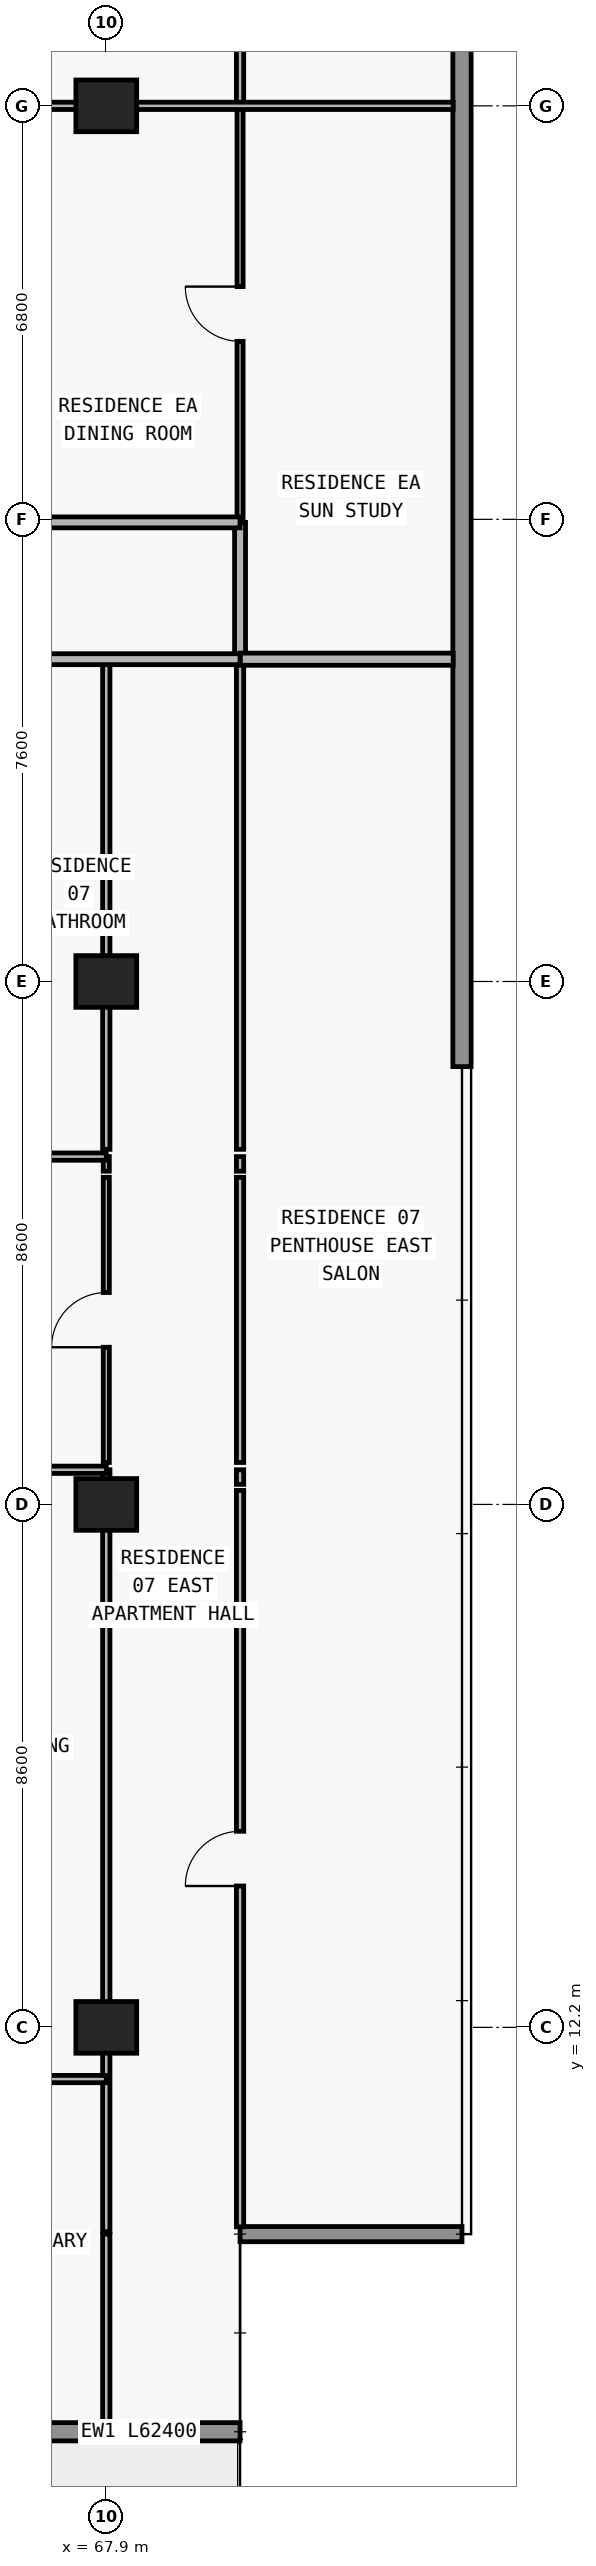
"""IFC4 building model, lengths in metres.
Left out: names, types, materials, properties, quantities, classifications, styles, units other than length and angle.
Written with IfcOpenShell. Run it as: python <this file> out.ifc"""

import sys

from ifc_helpers import new_model, si_unit, direction, frame, frame_2d, origin, origin_2d, place, context, subcontext, project, spatial, rectangle, extrude, element, fill, save


model = new_model("IFC4")
c1 = context("Model", 3, precision=1e-05, world=origin(), true_north=direction((0.0, 1.0)))
c2 = subcontext(c1, "Body", "Model", "MODEL_VIEW")
j1 = project(units=[si_unit("LENGTHUNIT", "METRE"), si_unit("PLANEANGLEUNIT", "RADIAN")], contexts=[c1])
p1 = place(None, origin())
s1 = spatial("IfcSite", under=j1, at=p1, CompositionType="ELEMENT")
p2 = place(p1, origin())
s2 = spatial("IfcBuilding", under=s1, at=p2, CompositionType="ELEMENT")
p3 = place(p2, frame((0.0, 0.0, 125.7)))
s3 = spatial("IfcBuildingStorey", under=s2, at=p3, CompositionType="ELEMENT", Elevation=125.7)
for number, where, z_axis, x_axis in (
    (1, (67.9, 12.2, 0.0), (0.0, 0.0, 1.0), (1.0, 0.0, 0.0)),
    (2, (67.9, 20.8, 0.0), (0.0, 0.0, 1.0), (1.0, 0.0, 0.0)),
    (3, (67.9, 29.4, 0.0), (0.0, 0.0, 1.0), (1.0, 0.0, 0.0)),
    (4, (67.9, 43.8, 0.0), (0.0, 0.0, 1.0), (1.0, 0.0, 0.0)),
):
    element("IfcColumn", number, at=place(p3, frame(where, z_axis=z_axis, x_axis=x_axis)), inside=s3, PredefinedType="COLUMN", context=c2, shape_type="SweptSolid", body=[
        extrude(rectangle(XDim=1.0, YDim=0.85, at=origin_2d()), origin(), (0.0, 0.0, 1.0), 3.05),
    ])
p4 = place(p3, frame((70.1, 5.55, 0.0), z_axis=(0.0, 0.0, 1.0), x_axis=(-1.0, 0.0, 0.0)))
e5 = element("IfcWall", 5, at=p4, inside=s3, PredefinedType="STANDARD", context=c2, shape_type="SweptSolid", body=[
    extrude(rectangle(XDim=62.4, YDim=0.3, at=frame_2d((31.2, 0.0))), origin(), (0.0, 0.0, 1.0), 3.05),
])
p5 = place(p4, frame((57.226, 0.0, 0.0)))
e6 = element("IfcOpeningElement", 6, at=p5, cuts=e5, PredefinedType="OPENING", context=c2, shape_type="SweptSolid", body=[
    extrude(rectangle(XDim=2.0, YDim=2.3, at=frame_2d((1.0, 1.15))), frame((0.0, 0.16, 0.0), z_axis=(0.0, -1.0, 0.0), x_axis=(1.0, 0.0, 0.0)), (0.0, 0.0, 1.0), 0.32),
])
p6 = place(p4, frame((52.926, 0.0, 0.85)))
e7 = element("IfcOpeningElement", 7, at=p6, cuts=e5, PredefinedType="OPENING", context=c2, shape_type="SweptSolid", body=[
    extrude(rectangle(XDim=2.2, YDim=1.55, at=frame_2d((1.1, 0.775))), frame((0.0, 0.16, 0.0), z_axis=(0.0, -1.0, 0.0), x_axis=(1.0, 0.0, 0.0)), (0.0, 0.0, 1.0), 0.32),
])
p7 = place(p4, frame((48.49, 0.0, 0.0)))
e8 = element("IfcOpeningElement", 8, at=p7, cuts=e5, PredefinedType="OPENING", context=c2, shape_type="SweptSolid", body=[
    extrude(rectangle(XDim=2.0, YDim=2.3, at=frame_2d((1.0, 1.15))), frame((0.0, 0.16, 0.0), z_axis=(0.0, -1.0, 0.0), x_axis=(1.0, 0.0, 0.0)), (0.0, 0.0, 1.0), 0.32),
])
p8 = place(p4, frame((44.39, 0.0, 0.85)))
e9 = element("IfcOpeningElement", 9, at=p8, cuts=e5, PredefinedType="OPENING", context=c2, shape_type="SweptSolid", body=[
    extrude(rectangle(XDim=1.8, YDim=1.55, at=frame_2d((0.9, 0.775))), frame((0.0, 0.16, 0.0), z_axis=(0.0, -1.0, 0.0), x_axis=(1.0, 0.0, 0.0)), (0.0, 0.0, 1.0), 0.32),
])
p9 = place(p4, frame((40.426, 0.0, 0.0)))
e10 = element("IfcOpeningElement", 10, at=p9, cuts=e5, PredefinedType="OPENING", context=c2, shape_type="SweptSolid", body=[
    extrude(rectangle(XDim=2.0, YDim=2.3, at=frame_2d((1.0, 1.15))), frame((0.0, 0.16, 0.0), z_axis=(0.0, -1.0, 0.0), x_axis=(1.0, 0.0, 0.0)), (0.0, 0.0, 1.0), 0.32),
])
p10 = place(p4, frame((36.126, 0.0, 0.85)))
e11 = element("IfcOpeningElement", 11, at=p10, cuts=e5, PredefinedType="OPENING", context=c2, shape_type="SweptSolid", body=[
    extrude(rectangle(XDim=2.2, YDim=1.55, at=frame_2d((1.1, 0.775))), frame((0.0, 0.16, 0.0), z_axis=(0.0, -1.0, 0.0), x_axis=(1.0, 0.0, 0.0)), (0.0, 0.0, 1.0), 0.32),
])
p11 = place(p4, frame((31.91, 0.0, 0.0)))
e12 = element("IfcOpeningElement", 12, at=p11, cuts=e5, PredefinedType="OPENING", context=c2, shape_type="SweptSolid", body=[
    extrude(rectangle(XDim=2.0, YDim=2.3, at=frame_2d((1.0, 1.15))), frame((0.0, 0.16, 0.0), z_axis=(0.0, -1.0, 0.0), x_axis=(1.0, 0.0, 0.0)), (0.0, 0.0, 1.0), 0.32),
])
p12 = place(p4, frame((28.21, 0.0, 0.85)))
e13 = element("IfcOpeningElement", 13, at=p12, cuts=e5, PredefinedType="OPENING", context=c2, shape_type="SweptSolid", body=[
    extrude(rectangle(XDim=1.8, YDim=1.55, at=frame_2d((0.9, 0.775))), frame((0.0, 0.16, 0.0), z_axis=(0.0, -1.0, 0.0), x_axis=(1.0, 0.0, 0.0)), (0.0, 0.0, 1.0), 0.32),
])
p13 = place(p4, frame((24.426, 0.0, 0.0)))
e14 = element("IfcOpeningElement", 14, at=p13, cuts=e5, PredefinedType="OPENING", context=c2, shape_type="SweptSolid", body=[
    extrude(rectangle(XDim=2.0, YDim=2.3, at=frame_2d((1.0, 1.15))), frame((0.0, 0.16, 0.0), z_axis=(0.0, -1.0, 0.0), x_axis=(1.0, 0.0, 0.0)), (0.0, 0.0, 1.0), 0.32),
])
p14 = place(p4, frame((20.126, 0.0, 0.85)))
e15 = element("IfcOpeningElement", 15, at=p14, cuts=e5, PredefinedType="OPENING", context=c2, shape_type="SweptSolid", body=[
    extrude(rectangle(XDim=2.2, YDim=1.55, at=frame_2d((1.1, 0.775))), frame((0.0, 0.16, 0.0), z_axis=(0.0, -1.0, 0.0), x_axis=(1.0, 0.0, 0.0)), (0.0, 0.0, 1.0), 0.32),
])
p15 = place(p4, frame((15.69, 0.0, 0.0)))
e16 = element("IfcOpeningElement", 16, at=p15, cuts=e5, PredefinedType="OPENING", context=c2, shape_type="SweptSolid", body=[
    extrude(rectangle(XDim=2.0, YDim=2.3, at=frame_2d((1.0, 1.15))), frame((0.0, 0.16, 0.0), z_axis=(0.0, -1.0, 0.0), x_axis=(1.0, 0.0, 0.0)), (0.0, 0.0, 1.0), 0.32),
])
p16 = place(p4, frame((11.59, 0.0, 0.85)))
e17 = element("IfcOpeningElement", 17, at=p16, cuts=e5, PredefinedType="OPENING", context=c2, shape_type="SweptSolid", body=[
    extrude(rectangle(XDim=1.8, YDim=1.55, at=frame_2d((0.9, 0.775))), frame((0.0, 0.16, 0.0), z_axis=(0.0, -1.0, 0.0), x_axis=(1.0, 0.0, 0.0)), (0.0, 0.0, 1.0), 0.32),
])
p17 = place(p4, frame((7.626, 0.0, 0.0)))
e18 = element("IfcOpeningElement", 18, at=p17, cuts=e5, PredefinedType="OPENING", context=c2, shape_type="SweptSolid", body=[
    extrude(rectangle(XDim=2.0, YDim=2.3, at=frame_2d((1.0, 1.15))), frame((0.0, 0.16, 0.0), z_axis=(0.0, -1.0, 0.0), x_axis=(1.0, 0.0, 0.0)), (0.0, 0.0, 1.0), 0.32),
])
p18 = place(p4, frame((3.326, 0.0, 0.85)))
e19 = element("IfcOpeningElement", 19, at=p18, cuts=e5, PredefinedType="OPENING", context=c2, shape_type="SweptSolid", body=[
    extrude(rectangle(XDim=2.2, YDim=1.55, at=frame_2d((1.1, 0.775))), frame((0.0, 0.16, 0.0), z_axis=(0.0, -1.0, 0.0), x_axis=(1.0, 0.0, 0.0)), (0.0, 0.0, 1.0), 0.32),
])
p19 = place(p3, frame((70.1, 8.8, 0.0), z_axis=(0.0, 0.0, 1.0), x_axis=(1.0, 0.0, 0.0)))
e20 = element("IfcWall", 20, at=p19, inside=s3, PredefinedType="ELEMENTEDWALL", context=c2, shape_type="SweptSolid", body=[
    extrude(rectangle(XDim=3.65, YDim=0.25, at=frame_2d((1.825, 0.0))), origin(), (0.0, 0.0, 1.0), 3.05),
])
p20 = place(p3, frame((73.75, 47.2, 0.0), z_axis=(0.0, 0.0, 1.0), x_axis=(0.0, -1.0, 0.0)))
e21 = element("IfcWall", 21, at=p20, inside=s3, PredefinedType="STANDARD", context=c2, shape_type="SweptSolid", body=[
    extrude(rectangle(XDim=19.2, YDim=0.3, at=frame_2d((9.6, 0.0))), origin(), (0.0, 0.0, 1.0), 3.05),
])
p21 = place(p3, frame((67.9, 5.695, 0.0), z_axis=(0.0, 0.0, 1.0), x_axis=(0.0, 1.0, 0.0)))
e22 = element("IfcWall", 22, at=p21, inside=s3, PredefinedType="PARTITIONING", context=c2, shape_type="SweptSolid", body=[
    extrude(rectangle(XDim=3.105, YDim=0.12, at=frame_2d((1.552, 0.0))), origin(), (0.0, 0.0, 1.0), 3.05),
])
p22 = place(p3, frame((67.9, 8.84, 0.0), z_axis=(0.0, 0.0, 1.0), x_axis=(0.0, 1.0, 0.0)))
e23 = element("IfcWall", 23, at=p22, inside=s3, PredefinedType="PARTITIONING", context=c2, shape_type="SweptSolid", body=[
    extrude(rectangle(XDim=12.19, YDim=0.12, at=frame_2d((6.095, 0.0))), origin(), (0.0, 0.0, 1.0), 2.174),
])
p23 = place(p3, frame((67.9, 21.13, 0.0), z_axis=(0.0, 0.0, 1.0), x_axis=(0.0, 1.0, 0.0)))
e24 = element("IfcWall", 24, at=p23, inside=s3, PredefinedType="PARTITIONING", context=c2, shape_type="SweptSolid", body=[
    extrude(rectangle(XDim=0.24, YDim=0.12, at=frame_2d((0.12, 0.0))), origin(), (0.0, 0.0, 1.0), 2.174),
])
p24 = place(p3, frame((67.9, 21.49, 0.0), z_axis=(0.0, 0.0, 1.0), x_axis=(0.0, 1.0, 0.0)))
e25 = element("IfcWall", 25, at=p24, inside=s3, PredefinedType="MOVABLE", context=c2, shape_type="SweptSolid", body=[
    extrude(rectangle(XDim=4.69, YDim=0.1, at=frame_2d((2.345, 0.0))), origin(), (0.0, 0.0, 1.0), 2.174),
])
p25 = place(p24, frame((1.895, 0.0, 0.0)))
e26 = element("IfcOpeningElement", 26, at=p25, cuts=e25, PredefinedType="OPENING", context=c2, shape_type="SweptSolid", body=[
    extrude(rectangle(XDim=0.9, YDim=2.124, at=frame_2d((0.45, 1.062))), frame((0.0, 0.06, 0.0), z_axis=(0.0, -1.0, 0.0), x_axis=(1.0, 0.0, 0.0)), (0.0, 0.0, 1.0), 0.12),
])
p26 = place(p3, frame((67.9, 26.28, 0.0), z_axis=(0.0, 0.0, 1.0), x_axis=(0.0, 1.0, 0.0)))
e27 = element("IfcWall", 27, at=p26, inside=s3, PredefinedType="MOVABLE", context=c2, shape_type="SweptSolid", body=[
    extrude(rectangle(XDim=0.24, YDim=0.1, at=frame_2d((0.12, 0.0))), origin(), (0.0, 0.0, 1.0), 2.174),
])
p27 = place(p3, frame((67.9, 26.64, 0.0), z_axis=(0.0, 0.0, 1.0), x_axis=(0.0, 1.0, 0.0)))
e28 = element("IfcWall", 28, at=p27, inside=s3, PredefinedType="PARTITIONING", context=c2, shape_type="SweptSolid", body=[
    extrude(rectangle(XDim=8.06, YDim=0.12, at=frame_2d((4.03, 0.0))), origin(), (0.0, 0.0, 1.0), 2.174),
])
p28 = place(p3, frame((70.1, 8.92, 0.0), z_axis=(0.0, 0.0, 1.0), x_axis=(0.0, 1.0, 0.0)))
e29 = element("IfcWall", 29, at=p28, inside=s3, PredefinedType="PARTITIONING", context=c2, shape_type="SweptSolid", body=[
    extrude(rectangle(XDim=12.11, YDim=0.12, at=frame_2d((6.055, 0.0))), origin(), (0.0, 0.0, 1.0), 3.05),
])
p29 = place(p28, frame((5.605, 0.0, 0.0)))
e30 = element("IfcOpeningElement", 30, at=p29, cuts=e29, PredefinedType="OPENING", context=c2, shape_type="SweptSolid", body=[
    extrude(rectangle(XDim=0.9, YDim=2.15, at=frame_2d((0.45, 1.075))), frame((0.0, 0.07, 0.0), z_axis=(0.0, -1.0, 0.0), x_axis=(1.0, 0.0, 0.0)), (0.0, 0.0, 1.0), 0.14),
])
p30 = place(p3, frame((70.1, 21.13, 0.0), z_axis=(0.0, 0.0, 1.0), x_axis=(0.0, 1.0, 0.0)))
e31 = element("IfcWall", 31, at=p30, inside=s3, PredefinedType="PARTITIONING", context=c2, shape_type="SweptSolid", body=[
    extrude(rectangle(XDim=0.24, YDim=0.12, at=frame_2d((0.12, 0.0))), origin(), (0.0, 0.0, 1.0), 3.05),
])
p31 = place(p3, frame((70.1, 21.49, 0.0), z_axis=(0.0, 0.0, 1.0), x_axis=(0.0, 1.0, 0.0)))
e32 = element("IfcWall", 32, at=p31, inside=s3, PredefinedType="PARTITIONING", context=c2, shape_type="SweptSolid", body=[
    extrude(rectangle(XDim=4.69, YDim=0.12, at=frame_2d((2.345, 0.0))), origin(), (0.0, 0.0, 1.0), 3.05),
])
p32 = place(p3, frame((70.1, 26.28, 0.0), z_axis=(0.0, 0.0, 1.0), x_axis=(0.0, 1.0, 0.0)))
e33 = element("IfcWall", 33, at=p32, inside=s3, PredefinedType="PARTITIONING", context=c2, shape_type="SweptSolid", body=[
    extrude(rectangle(XDim=0.24, YDim=0.12, at=frame_2d((0.12, 0.0))), origin(), (0.0, 0.0, 1.0), 3.05),
])
p33 = place(p3, frame((70.1, 26.64, 0.0), z_axis=(0.0, 0.0, 1.0), x_axis=(0.0, 1.0, 0.0)))
e34 = element("IfcWall", 34, at=p33, inside=s3, PredefinedType="PARTITIONING", context=c2, shape_type="SweptSolid", body=[
    extrude(rectangle(XDim=8.06, YDim=0.12, at=frame_2d((4.03, 0.0))), origin(), (0.0, 0.0, 1.0), 3.05),
])
p34 = place(p3, frame((70.1, 34.705, 0.0), z_axis=(0.0, 0.0, 1.0), x_axis=(0.0, 1.0, 0.0)))
e35 = element("IfcWall", 35, at=p34, inside=s3, PredefinedType="PARTITIONING", context=c2, shape_type="SweptSolid", body=[
    extrude(rectangle(XDim=2.245, YDim=0.18, at=frame_2d((1.123, 0.0))), origin(), (0.0, 0.0, 1.0), 3.05),
])
p35 = place(p3, frame((70.1, 36.955, 0.0), z_axis=(0.0, 0.0, 1.0), x_axis=(0.0, 1.0, 0.0)))
e36 = element("IfcWall", 36, at=p35, inside=s3, PredefinedType="MOVABLE", context=c2, shape_type="SweptSolid", body=[
    extrude(rectangle(XDim=6.845, YDim=0.1, at=frame_2d((3.422, 0.0))), origin(), (0.0, 0.0, 1.0), 3.05),
])
p36 = place(p35, frame((2.972, 0.0, 0.0)))
e37 = element("IfcOpeningElement", 37, at=p36, cuts=e36, PredefinedType="OPENING", context=c2, shape_type="SweptSolid", body=[
    extrude(rectangle(XDim=0.9, YDim=2.15, at=frame_2d((0.45, 1.075))), frame((0.0, 0.06, 0.0), z_axis=(0.0, -1.0, 0.0), x_axis=(1.0, 0.0, 0.0)), (0.0, 0.0, 1.0), 0.12),
])
p37 = place(p3, frame((70.1, 43.805, 0.0), z_axis=(0.0, 0.0, 1.0), x_axis=(0.0, 1.0, 0.0)))
e38 = element("IfcWall", 38, at=p37, inside=s3, PredefinedType="PARTITIONING", context=c2, shape_type="SweptSolid", body=[
    extrude(rectangle(XDim=3.275, YDim=0.12, at=frame_2d((1.638, 0.0))), origin(), (0.0, 0.0, 1.0), 3.05),
])
p38 = place(p37, frame((1.188, 0.0, 0.0)))
e39 = element("IfcOpeningElement", 39, at=p38, cuts=e38, PredefinedType="OPENING", context=c2, shape_type="SweptSolid", body=[
    extrude(rectangle(XDim=0.9, YDim=2.15, at=frame_2d((0.45, 1.075))), frame((0.0, 0.07, 0.0), z_axis=(0.0, -1.0, 0.0), x_axis=(1.0, 0.0, 0.0)), (0.0, 0.0, 1.0), 0.14),
])
p39 = place(p3, frame((63.448, 11.35, 0.0), z_axis=(0.0, 0.0, 1.0), x_axis=(1.0, 0.0, 0.0)))
e40 = element("IfcWall", 40, at=p39, inside=s3, PredefinedType="PARTITIONING", context=c2, shape_type="SweptSolid", body=[
    extrude(rectangle(XDim=4.452, YDim=0.12, at=frame_2d((2.226, 0.0))), origin(), (0.0, 0.0, 1.0), 3.05),
])
p40 = place(p39, frame((1.776, 0.0, 0.0)))
e41 = element("IfcOpeningElement", 41, at=p40, cuts=e40, PredefinedType="OPENING", context=c2, shape_type="SweptSolid", body=[
    extrude(rectangle(XDim=0.9, YDim=2.15, at=frame_2d((0.45, 1.075))), frame((0.0, 0.07, 0.0), z_axis=(0.0, -1.0, 0.0), x_axis=(1.0, 0.0, 0.0)), (0.0, 0.0, 1.0), 0.14),
])
p41 = place(p3, frame((59.55, 21.37, 0.0), z_axis=(0.0, 0.0, 1.0), x_axis=(1.0, 0.0, 0.0)))
e42 = element("IfcWall", 42, at=p41, inside=s3, PredefinedType="PARTITIONING", context=c2, shape_type="SweptSolid", body=[
    extrude(rectangle(XDim=8.35, YDim=0.12, at=frame_2d((4.175, 0.0))), origin(), (0.0, 0.0, 1.0), 3.05),
])
p42 = place(p41, frame((1.499, 0.0, 0.0)))
e43 = element("IfcOpeningElement", 43, at=p42, cuts=e42, PredefinedType="OPENING", context=c2, shape_type="SweptSolid", body=[
    extrude(rectangle(XDim=0.9, YDim=2.15, at=frame_2d((0.45, 1.075))), frame((0.0, 0.07, 0.0), z_axis=(0.0, -1.0, 0.0), x_axis=(1.0, 0.0, 0.0)), (0.0, 0.0, 1.0), 0.14),
])
p43 = place(p41, frame((6.093, 0.0, 0.0)))
e44 = element("IfcOpeningElement", 44, at=p43, cuts=e42, PredefinedType="OPENING", context=c2, shape_type="SweptSolid", body=[
    extrude(rectangle(XDim=0.9, YDim=2.15, at=frame_2d((0.45, 1.075))), frame((0.0, 0.07, 0.0), z_axis=(0.0, -1.0, 0.0), x_axis=(1.0, 0.0, 0.0)), (0.0, 0.0, 1.0), 0.14),
])
p44 = place(p3, frame((59.55, 26.52, 0.0), z_axis=(0.0, 0.0, 1.0), x_axis=(1.0, 0.0, 0.0)))
e45 = element("IfcWall", 45, at=p44, inside=s3, PredefinedType="PARTITIONING", context=c2, shape_type="SweptSolid", body=[
    extrude(rectangle(XDim=8.35, YDim=0.12, at=frame_2d((4.175, 0.0))), origin(), (0.0, 0.0, 1.0), 3.05),
])
p45 = place(p44, frame((1.918, 0.0, 0.0)))
e46 = element("IfcOpeningElement", 46, at=p45, cuts=e45, PredefinedType="OPENING", context=c2, shape_type="SweptSolid", body=[
    extrude(rectangle(XDim=0.9, YDim=2.15, at=frame_2d((0.45, 1.075))), frame((0.0, 0.07, 0.0), z_axis=(0.0, -1.0, 0.0), x_axis=(1.0, 0.0, 0.0)), (0.0, 0.0, 1.0), 0.14),
])
p46 = place(p3, frame((59.55, 34.7, 0.0), z_axis=(0.0, 0.0, 1.0), x_axis=(1.0, 0.0, 0.0)))
e47 = element("IfcWall", 47, at=p46, inside=s3, PredefinedType="PARTITIONING", context=c2, shape_type="SweptSolid", body=[
    extrude(rectangle(XDim=10.55, YDim=0.18, at=frame_2d((5.275, 0.0))), origin(), (0.0, 0.0, 1.0), 3.05),
])
p47 = place(p46, frame((2.85, 0.0, 0.0)))
e48 = element("IfcOpeningElement", 48, at=p47, cuts=e47, PredefinedType="OPENING", context=c2, shape_type="SweptSolid", body=[
    extrude(rectangle(XDim=1.0, YDim=2.2, at=frame_2d((0.5, 1.1))), frame((0.0, 0.1, 0.0), z_axis=(0.0, -1.0, 0.0), x_axis=(1.0, 0.0, 0.0)), (0.0, 0.0, 1.0), 0.2),
])
p48 = place(p3, frame((70.105, 34.7, 0.0), z_axis=(0.0, 0.0, 1.0), x_axis=(1.0, 0.0, 0.0)))
e49 = element("IfcWall", 49, at=p48, inside=s3, PredefinedType="PARTITIONING", context=c2, shape_type="SweptSolid", body=[
    extrude(rectangle(XDim=3.5, YDim=0.2, at=frame_2d((1.75, 0.0))), origin(), (0.0, 0.0, 1.0), 3.05),
])
p49 = place(p3, frame((59.955, 36.95, 0.0), z_axis=(0.0, 0.0, 1.0), x_axis=(1.0, 0.0, 0.0)))
e50 = element("IfcWall", 50, at=p49, inside=s3, PredefinedType="PARTITIONING", context=c2, shape_type="SweptSolid", body=[
    extrude(rectangle(XDim=10.145, YDim=0.18, at=frame_2d((5.073, 0.0))), origin(), (0.0, 0.0, 1.0), 3.05),
])
p50 = place(p49, frame((3.957, 0.0, 0.0)))
e51 = element("IfcOpeningElement", 51, at=p50, cuts=e50, PredefinedType="OPENING", context=c2, shape_type="SweptSolid", body=[
    extrude(rectangle(XDim=1.0, YDim=2.2, at=frame_2d((0.5, 1.1))), frame((0.0, 0.1, 0.0), z_axis=(0.0, -1.0, 0.0), x_axis=(1.0, 0.0, 0.0)), (0.0, 0.0, 1.0), 0.2),
])
p51 = place(p3, frame((59.945, 43.8, 0.0), z_axis=(0.0, 0.0, 1.0), x_axis=(1.0, 0.0, 0.0)))
e52 = element("IfcWall", 52, at=p51, inside=s3, PredefinedType="PARTITIONING", context=c2, shape_type="SweptSolid", body=[
    extrude(rectangle(XDim=13.66, YDim=0.12, at=frame_2d((6.83, 0.0))), origin(), (0.0, 0.0, 1.0), 2.339),
])
p52 = place(p51, frame((4.017, 0.0, 0.0)))
e53 = element("IfcOpeningElement", 53, at=p52, cuts=e52, PredefinedType="OPENING", context=c2, shape_type="SweptSolid", body=[
    extrude(rectangle(XDim=0.9, YDim=2.15, at=frame_2d((0.45, 1.075))), frame((0.0, 0.07, 0.0), z_axis=(0.0, -1.0, 0.0), x_axis=(1.0, 0.0, 0.0)), (0.0, 0.0, 1.0), 0.14),
])
p53 = place(p51, frame((0.702, 0.0, 0.0)))
e54 = element("IfcOpeningElement", 54, at=p53, cuts=e52, PredefinedType="OPENING", context=c2, shape_type="SweptSolid", body=[
    extrude(rectangle(XDim=0.85, YDim=2.1, at=frame_2d((0.425, 1.05))), frame((0.0, 0.07, 0.0), z_axis=(0.0, -1.0, 0.0), x_axis=(1.0, 0.0, 0.0)), (0.0, 0.0, 1.0), 0.14),
])
p54 = place(p25, origin())
e55 = element("IfcDoor", 55, at=p54, inside=s3, OperationType="SINGLE_SWING_LEFT", PredefinedType="DOOR", context=c2, shape_type="SweptSolid", body=[
    extrude(rectangle(XDim=0.9, YDim=2.124, at=frame_2d((0.45, 1.062))), frame((0.0, 0.025, 0.0), z_axis=(0.0, -1.0, 0.0), x_axis=(1.0, 0.0, 0.0)), (0.0, 0.0, 1.0), 0.05),
])
fill(e26, e55)
p55 = place(p29, origin())
e56 = element("IfcDoor", 56, at=p55, inside=s3, OperationType="SINGLE_SWING_LEFT", PredefinedType="DOOR", context=c2, shape_type="SweptSolid", body=[
    extrude(rectangle(XDim=0.9, YDim=2.15, at=frame_2d((0.45, 1.075))), frame((0.0, 0.025, 0.0), z_axis=(0.0, -1.0, 0.0), x_axis=(1.0, 0.0, 0.0)), (0.0, 0.0, 1.0), 0.05),
])
fill(e30, e56)
p56 = place(p36, origin())
e57 = element("IfcDoor", 57, at=p56, inside=s3, OperationType="SINGLE_SWING_RIGHT", PredefinedType="DOOR", context=c2, shape_type="SweptSolid", body=[
    extrude(rectangle(XDim=0.9, YDim=2.15, at=frame_2d((0.45, 1.075))), frame((0.0, 0.025, 0.0), z_axis=(0.0, -1.0, 0.0), x_axis=(1.0, 0.0, 0.0)), (0.0, 0.0, 1.0), 0.05),
])
fill(e37, e57)
save(model, sys.argv[1])
